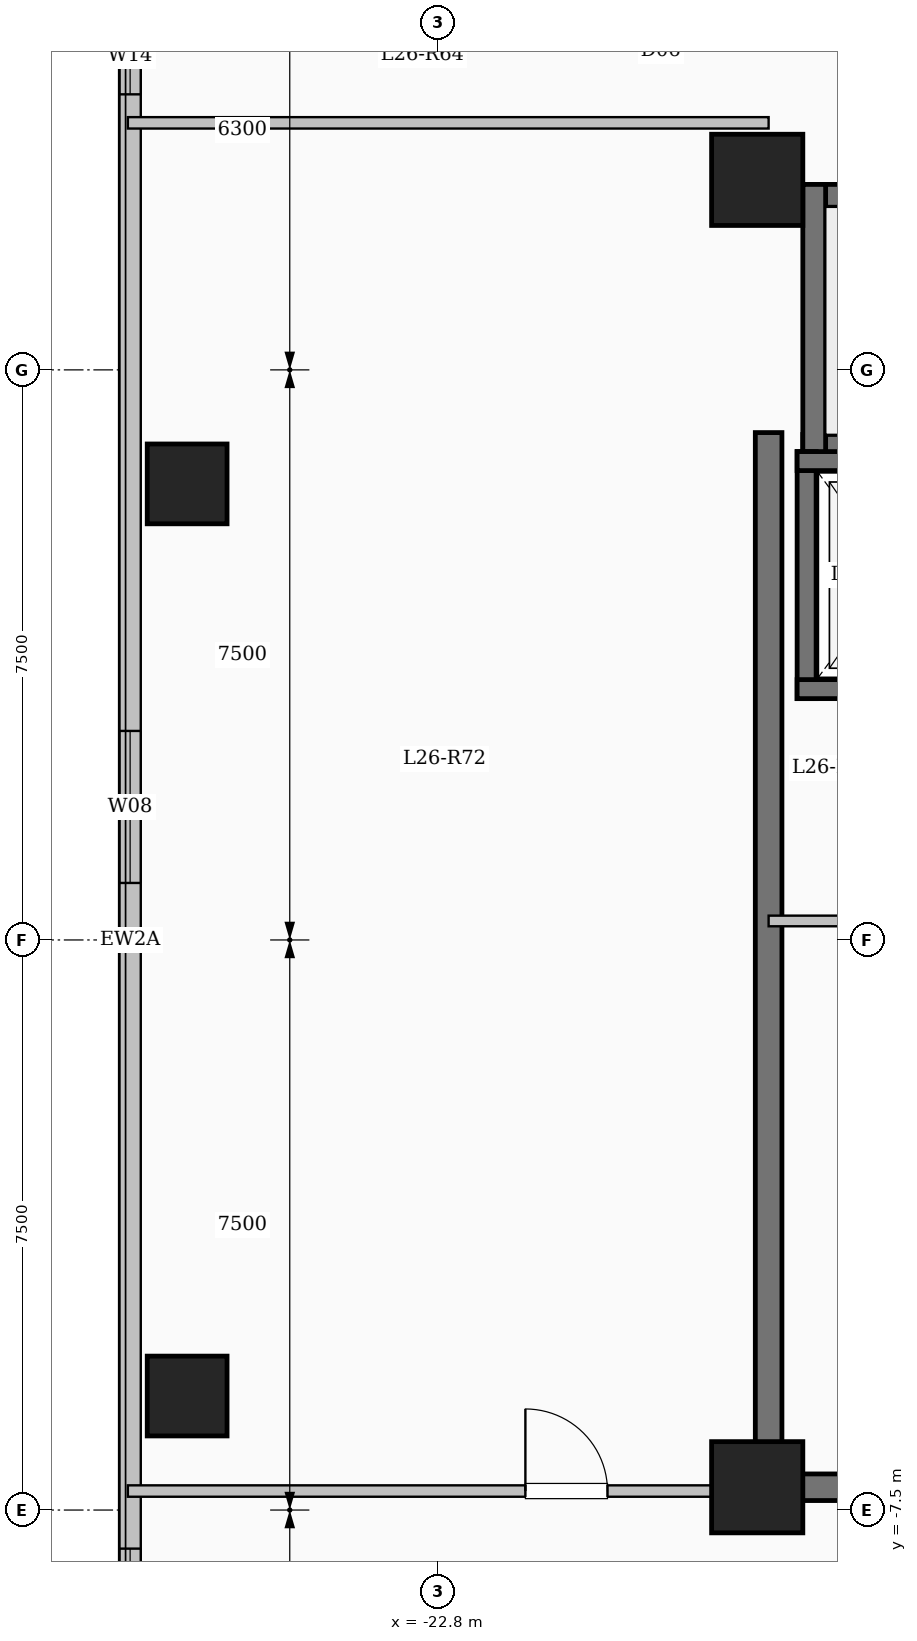
"""IFC4 building model, lengths in metres.
Left out: names, types, materials, properties, quantities, classifications, styles, units other than length and angle.
Written with IfcOpenShell. Run it as: python <this file> out.ifc"""

import sys

from ifc_helpers import new_model, si_unit, direction, frame, frame_2d, origin, origin_2d, place, context, subcontext, project, spatial, rectangle, extrude, element, fill, save


model = new_model("IFC4")
c1 = context("Model", 3, precision=1e-05, world=origin(), true_north=direction((0.0, 1.0)))
c2 = subcontext(c1, "Body", "Model", "MODEL_VIEW")
j1 = project(units=[si_unit("LENGTHUNIT", "METRE"), si_unit("PLANEANGLEUNIT", "RADIAN")], contexts=[c1])
p1 = place(None, origin())
s1 = spatial("IfcSite", under=j1, at=p1, CompositionType="ELEMENT")
p2 = place(p1, origin())
s2 = spatial("IfcBuilding", under=s1, at=p2, CompositionType="ELEMENT")
p3 = place(p2, frame((0.0, 0.0, 98.4)))
s3 = spatial("IfcBuildingStorey", under=s2, at=p3, CompositionType="ELEMENT", Elevation=98.4)
for number, where, z_axis, x_axis in (
    (1, (-18.6, -7.2, 0.0), (0.0, 0.0, 1.0), (1.0, 0.0, 0.0)),
    (2, (-18.6, 10.0, 0.0), (0.0, 0.0, 1.0), (1.0, 0.0, 0.0)),
):
    element("IfcColumn", number, at=place(p3, frame(where, z_axis=z_axis, x_axis=x_axis)), inside=s3, PredefinedType="COLUMN", context=c2, shape_type="SweptSolid", body=[
        extrude(rectangle(XDim=1.2, YDim=1.2, at=origin_2d()), origin(), (0.0, 0.0, 1.0), 3.35),
    ])
for number, where, z_axis, x_axis in (
    (3, (-26.1, -6.0, 0.0), (0.0, 0.0, 1.0), (1.0, 0.0, 0.0)),
    (4, (-26.1, 6.0, 0.0), (0.0, 0.0, 1.0), (1.0, 0.0, 0.0)),
):
    element("IfcColumn", number, at=place(p3, frame(where, z_axis=z_axis, x_axis=x_axis)), inside=s3, PredefinedType="COLUMN", context=c2, shape_type="SweptSolid", body=[
        extrude(rectangle(XDim=1.05, YDim=1.05, at=origin_2d()), origin(), (0.0, 0.0, 1.0), 3.35),
    ])
p4 = place(p3, frame((-26.85, -17.85, 0.0), z_axis=(0.0, 0.0, 1.0), x_axis=(0.0, 1.0, 0.0)))
e5 = element("IfcWall", 5, at=p4, inside=s3, PredefinedType="SOLIDWALL", context=c2, shape_type="SweptSolid", body=[
    extrude(rectangle(XDim=35.7, YDim=0.28, at=frame_2d((17.85, 0.0))), origin(), (0.0, 0.0, 1.0), 3.1),
])
p5 = place(p4, frame((2.55, 0.0, 0.9)))
e6 = element("IfcOpeningElement", 6, at=p5, cuts=e5, PredefinedType="OPENING", context=c2, shape_type="SweptSolid", body=[
    extrude(rectangle(XDim=2.4, YDim=1.8, at=frame_2d((1.2, 0.9))), frame((0.0, 0.15, 0.0), z_axis=(0.0, -1.0, 0.0), x_axis=(1.0, 0.0, 0.0)), (0.0, 0.0, 1.0), 0.3),
])
p6 = place(p4, frame((8.343, 0.0, 0.9)))
e7 = element("IfcOpeningElement", 7, at=p6, cuts=e5, PredefinedType="OPENING", context=c2, shape_type="SweptSolid", body=[
    extrude(rectangle(XDim=1.5, YDim=1.65, at=frame_2d((0.75, 0.825))), frame((0.0, 0.15, 0.0), z_axis=(0.0, -1.0, 0.0), x_axis=(1.0, 0.0, 0.0)), (0.0, 0.0, 1.0), 0.3),
])
p7 = place(p4, frame((18.6, 0.0, 0.9)))
e8 = element("IfcOpeningElement", 8, at=p7, cuts=e5, PredefinedType="OPENING", context=c2, shape_type="SweptSolid", body=[
    extrude(rectangle(XDim=2.0, YDim=1.7, at=frame_2d((1.0, 0.85))), frame((0.0, 0.15, 0.0), z_axis=(0.0, -1.0, 0.0), x_axis=(1.0, 0.0, 0.0)), (0.0, 0.0, 1.0), 0.3),
])
p8 = place(p4, frame((28.975, 0.0, 0.95)))
e9 = element("IfcOpeningElement", 9, at=p8, cuts=e5, PredefinedType="OPENING", context=c2, shape_type="SweptSolid", body=[
    extrude(rectangle(XDim=1.0, YDim=1.5, at=frame_2d((0.5, 0.75))), frame((0.0, 0.15, 0.0), z_axis=(0.0, -1.0, 0.0), x_axis=(1.0, 0.0, 0.0)), (0.0, 0.0, 1.0), 0.3),
])
p9 = place(p4, frame((32.025, 0.0, 0.9)))
e10 = element("IfcOpeningElement", 10, at=p9, cuts=e5, PredefinedType="OPENING", context=c2, shape_type="SweptSolid", body=[
    extrude(rectangle(XDim=2.0, YDim=1.7, at=frame_2d((1.0, 0.85))), frame((0.0, 0.15, 0.0), z_axis=(0.0, -1.0, 0.0), x_axis=(1.0, 0.0, 0.0)), (0.0, 0.0, 1.0), 0.3),
])
p10 = place(p3, frame((-18.0, 9.79, 0.0), z_axis=(0.0, 0.0, 1.0), x_axis=(1.0, 0.0, 0.0)))
e11 = element("IfcWall", 11, at=p10, inside=s3, PredefinedType="SHEAR", context=c2, shape_type="SweptSolid", body=[
    extrude(rectangle(XDim=8.0, YDim=0.3, at=frame_2d((4.0, 0.0))), origin(), (0.0, 0.0, 1.0), 3.35),
])
p11 = place(p3, frame((-18.0, 6.5, 0.0), z_axis=(0.0, 0.0, 1.0), x_axis=(1.0, 0.0, 0.0)))
e12 = element("IfcWall", 12, at=p11, inside=s3, PredefinedType="SHEAR", context=c2, shape_type="SweptSolid", body=[
    extrude(rectangle(XDim=8.0, YDim=0.3, at=frame_2d((4.0, 0.0))), origin(), (0.0, 0.0, 1.0), 3.35),
])
p12 = place(p11, frame((6.45, 0.0, 0.0)))
e13 = element("IfcOpeningElement", 13, at=p12, cuts=e12, PredefinedType="OPENING", context=c2, shape_type="SweptSolid", body=[
    extrude(rectangle(XDim=1.0, YDim=2.15, at=frame_2d((0.5, 1.075))), frame((0.0, 0.16, 0.0), z_axis=(0.0, -1.0, 0.0), x_axis=(1.0, 0.0, 0.0)), (0.0, 0.0, 1.0), 0.32),
])
p13 = place(p3, frame((-17.85, 6.35, 0.0), z_axis=(0.0, 0.0, 1.0), x_axis=(0.0, 1.0, 0.0)))
e14 = element("IfcWall", 14, at=p13, inside=s3, PredefinedType="SHEAR", context=c2, shape_type="SweptSolid", body=[
    extrude(rectangle(XDim=3.59, YDim=0.3, at=frame_2d((1.795, 0.0))), origin(), (0.0, 0.0, 1.0), 3.35),
])
p14 = place(p3, frame((-17.95, 3.175, 0.0), z_axis=(0.0, 0.0, 1.0), x_axis=(0.0, 1.0, 0.0)))
e15 = element("IfcWall", 15, at=p14, inside=s3, PredefinedType="SHEAR", context=c2, shape_type="SweptSolid", body=[
    extrude(rectangle(XDim=3.25, YDim=0.25, at=frame_2d((1.625, 0.0))), origin(), (0.0, 0.0, 1.0), 3.35),
])
for number, where, z_axis, x_axis in (
    (16, (-18.075, 3.3, 0.0), (0.0, 0.0, 1.0), (1.0, 0.0, 0.0)),
    (17, (-18.075, 6.3, 0.0), (0.0, 0.0, 1.0), (1.0, 0.0, 0.0)),
):
    element("IfcWall", number, at=place(p3, frame(where, z_axis=z_axis, x_axis=x_axis)), inside=s3, PredefinedType="SHEAR", context=c2, shape_type="SweptSolid", body=[
        extrude(rectangle(XDim=2.55, YDim=0.25, at=frame_2d((1.275, 0.0))), origin(), (0.0, 0.0, 1.0), 3.35),
    ])
p15 = place(p3, frame((-18.45, -7.375, 0.0), z_axis=(0.0, 0.0, 1.0), x_axis=(0.0, 1.0, 0.0)))
e18 = element("IfcWall", 18, at=p15, inside=s3, PredefinedType="SHEAR", context=c2, shape_type="SweptSolid", body=[
    extrude(rectangle(XDim=14.05, YDim=0.35, at=frame_2d((7.025, 0.0))), origin(), (0.0, 0.0, 1.0), 3.35),
])
p16 = place(p3, frame((-18.625, -7.2, 0.0), z_axis=(0.0, 0.0, 1.0), x_axis=(1.0, 0.0, 0.0)))
e19 = element("IfcWall", 19, at=p16, inside=s3, PredefinedType="SHEAR", context=c2, shape_type="SweptSolid", body=[
    extrude(rectangle(XDim=8.55, YDim=0.35, at=frame_2d((4.275, 0.0))), origin(), (0.0, 0.0, 1.0), 3.35),
])
p17 = place(p3, frame((-18.45, 0.25, 0.0), z_axis=(0.0, 0.0, 1.0), x_axis=(1.0, 0.0, 0.0)))
e20 = element("IfcWall", 20, at=p17, inside=s3, PredefinedType="PARTITIONING", context=c2, shape_type="SweptSolid", body=[
    extrude(rectangle(XDim=3.05, YDim=0.14, at=frame_2d((1.525, 0.0))), origin(), (0.0, 0.0, 1.0), 3.1),
])
p18 = place(p17, frame((1.05, 0.0, 0.0)))
e21 = element("IfcOpeningElement", 21, at=p18, cuts=e20, PredefinedType="OPENING", context=c2, shape_type="SweptSolid", body=[
    extrude(rectangle(XDim=0.9, YDim=2.08, at=frame_2d((0.45, 1.04))), frame((0.0, 0.08, 0.0), z_axis=(0.0, -1.0, 0.0), x_axis=(1.0, 0.0, 0.0)), (0.0, 0.0, 1.0), 0.16),
])
p19 = place(p3, frame((-26.88, -7.25, 0.0), z_axis=(0.0, 0.0, 1.0), x_axis=(1.0, 0.0, 0.0)))
e22 = element("IfcWall", 22, at=p19, inside=s3, PredefinedType="PARTITIONING", context=c2, shape_type="SweptSolid", body=[
    extrude(rectangle(XDim=8.43, YDim=0.15, at=frame_2d((4.215, 0.0))), origin(), (0.0, 0.0, 1.0), 3.1),
])
p20 = place(p19, frame((5.23, 0.0, 0.0)))
e23 = element("IfcOpeningElement", 23, at=p20, cuts=e22, PredefinedType="OPENING", context=c2, shape_type="SweptSolid", body=[
    extrude(rectangle(XDim=1.08, YDim=2.15, at=frame_2d((0.54, 1.075))), frame((0.0, 0.085, 0.0), z_axis=(0.0, -1.0, 0.0), x_axis=(1.0, 0.0, 0.0)), (0.0, 0.0, 1.0), 0.17),
])
p21 = place(p3, frame((-26.88, 10.75, 0.0), z_axis=(0.0, 0.0, 1.0), x_axis=(1.0, 0.0, 0.0)))
e24 = element("IfcWall", 24, at=p21, inside=s3, PredefinedType="PARTITIONING", context=c2, shape_type="SweptSolid", body=[
    extrude(rectangle(XDim=8.43, YDim=0.15, at=frame_2d((4.215, 0.0))), origin(), (0.0, 0.0, 1.0), 3.1),
])
p22 = place(p6, origin())
e25 = element("IfcWindow", 25, at=p22, inside=s3, PartitioningType="SINGLE_PANEL", PredefinedType="WINDOW", context=c2, shape_type="SweptSolid", body=[
    extrude(rectangle(XDim=1.5, YDim=1.65, at=frame_2d((0.75, 0.825))), frame((0.0, 0.03, 0.0), z_axis=(0.0, -1.0, 0.0), x_axis=(1.0, 0.0, 0.0)), (0.0, 0.0, 1.0), 0.06),
])
fill(e7, e25)
p23 = place(p7, origin())
e26 = element("IfcWindow", 26, at=p23, inside=s3, PartitioningType="SINGLE_PANEL", PredefinedType="WINDOW", context=c2, shape_type="SweptSolid", body=[
    extrude(rectangle(XDim=2.0, YDim=1.7, at=frame_2d((1.0, 0.85))), frame((0.0, 0.03, 0.0), z_axis=(0.0, -1.0, 0.0), x_axis=(1.0, 0.0, 0.0)), (0.0, 0.0, 1.0), 0.06),
])
fill(e8, e26)
p24 = place(p8, origin())
e27 = element("IfcWindow", 27, at=p24, inside=s3, PartitioningType="SINGLE_PANEL", PredefinedType="WINDOW", context=c2, shape_type="SweptSolid", body=[
    extrude(rectangle(XDim=1.0, YDim=1.5, at=frame_2d((0.5, 0.75))), frame((0.0, 0.03, 0.0), z_axis=(0.0, -1.0, 0.0), x_axis=(1.0, 0.0, 0.0)), (0.0, 0.0, 1.0), 0.06),
])
fill(e9, e27)
p25 = place(p20, origin())
e28 = element("IfcDoor", 28, at=p25, inside=s3, OperationType="SINGLE_SWING_LEFT", PredefinedType="DOOR", context=c2, shape_type="SweptSolid", body=[
    extrude(rectangle(XDim=1.08, YDim=2.15, at=frame_2d((0.54, 1.075))), frame((0.0, 0.025, 0.0), z_axis=(0.0, -1.0, 0.0), x_axis=(1.0, 0.0, 0.0)), (0.0, 0.0, 1.0), 0.05),
])
fill(e23, e28)
save(model, sys.argv[1])
